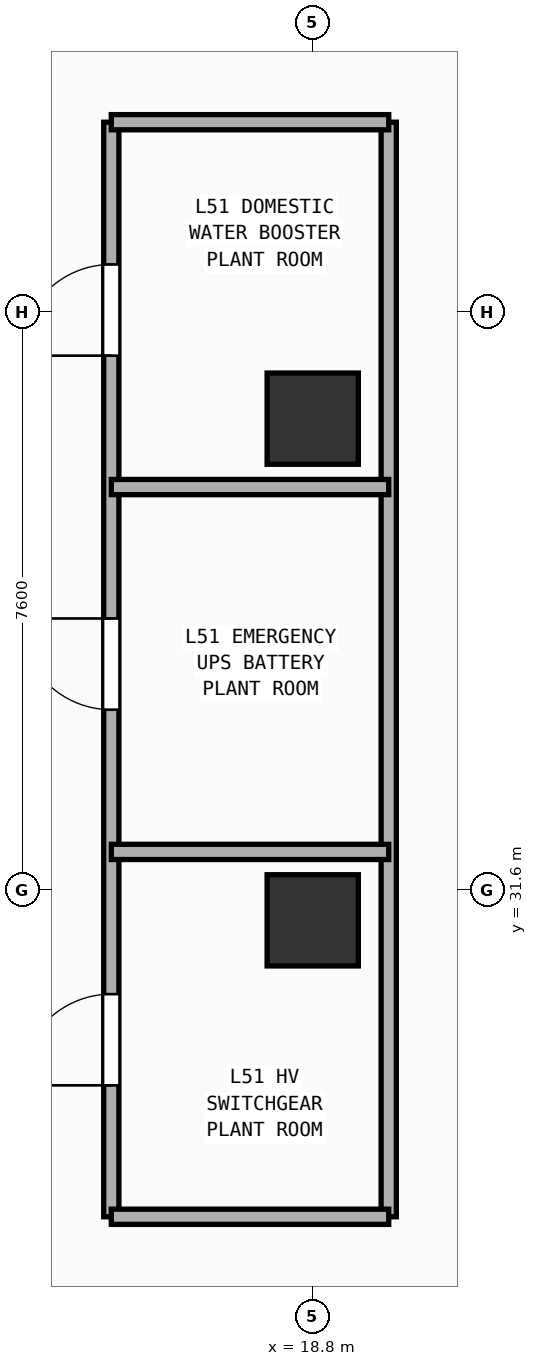
"""IFC4 building model, lengths in metres.
Left out: names, types, materials, properties, quantities, classifications, styles, units other than length and angle.
Written with IfcOpenShell. Run it as: python <this file> out.ifc"""

import sys

from ifc_helpers import new_model, si_unit, direction, frame, frame_2d, origin, origin_2d, place, context, subcontext, project, spatial, rectangle, extrude, element, fill, save


model = new_model("IFC4")
c1 = context("Model", 3, precision=1e-05, world=origin(), true_north=direction((0.0, 1.0)))
c2 = subcontext(c1, "Body", "Model", "MODEL_VIEW")
j1 = project(units=[si_unit("LENGTHUNIT", "METRE"), si_unit("PLANEANGLEUNIT", "RADIAN")], contexts=[c1])
p1 = place(None, origin())
s1 = spatial("IfcSite", under=j1, at=p1, CompositionType="ELEMENT")
p2 = place(p1, origin())
s2 = spatial("IfcBuilding", under=s1, at=p2, CompositionType="ELEMENT")
p3 = place(p2, frame((0.0, 0.0, 199.4)))
s3 = spatial("IfcBuildingStorey", under=s2, at=p3, CompositionType="ELEMENT", Elevation=199.4)
for number, where, z_axis, x_axis in (
    (1, (18.8, 31.2, 0.0), (0.0, 0.0, 1.0), (1.0, 0.0, 0.0)),
    (2, (18.8, 37.8, 0.0), (0.0, 0.0, 1.0), (1.0, 0.0, 0.0)),
):
    element("IfcColumn", number, at=place(p3, frame(where, z_axis=z_axis, x_axis=x_axis)), inside=s3, PredefinedType="COLUMN", context=c2, shape_type="SweptSolid", body=[
        extrude(rectangle(XDim=1.2, YDim=1.2, at=origin_2d()), origin(), (0.0, 0.0, 1.0), 4.86),
    ])
p4 = place(p3, frame((16.15, 27.3, 0.0), z_axis=(0.0, 0.0, 1.0), x_axis=(0.0, 1.0, 0.0)))
e3 = element("IfcWall", 3, at=p4, inside=s3, PredefinedType="PARTITIONING", context=c2, shape_type="SweptSolid", body=[
    extrude(rectangle(XDim=14.4, YDim=0.2, at=frame_2d((7.2, 0.0))), origin(), (0.0, 0.0, 1.0), 4.86),
])
p5 = place(p4, frame((1.729, 0.0, 0.0)))
e4 = element("IfcOpeningElement", 4, at=p5, cuts=e3, PredefinedType="OPENING", context=c2, shape_type="SweptSolid", body=[
    extrude(rectangle(XDim=1.2, YDim=2.25, at=frame_2d((0.6, 1.125))), frame((0.0, 0.11, 0.0), z_axis=(0.0, -1.0, 0.0), x_axis=(1.0, 0.0, 0.0)), (0.0, 0.0, 1.0), 0.22),
])
p6 = place(p4, frame((6.671, 0.0, 0.0)))
e5 = element("IfcOpeningElement", 5, at=p6, cuts=e3, PredefinedType="OPENING", context=c2, shape_type="SweptSolid", body=[
    extrude(rectangle(XDim=1.2, YDim=2.25, at=frame_2d((0.6, 1.125))), frame((0.0, 0.11, 0.0), z_axis=(0.0, -1.0, 0.0), x_axis=(1.0, 0.0, 0.0)), (0.0, 0.0, 1.0), 0.22),
])
p7 = place(p4, frame((11.329, 0.0, 0.0)))
e6 = element("IfcOpeningElement", 6, at=p7, cuts=e3, PredefinedType="OPENING", context=c2, shape_type="SweptSolid", body=[
    extrude(rectangle(XDim=1.2, YDim=2.25, at=frame_2d((0.6, 1.125))), frame((0.0, 0.11, 0.0), z_axis=(0.0, -1.0, 0.0), x_axis=(1.0, 0.0, 0.0)), (0.0, 0.0, 1.0), 0.22),
])
p8 = place(p3, frame((19.8, 27.3, 0.0), z_axis=(0.0, 0.0, 1.0), x_axis=(0.0, 1.0, 0.0)))
e7 = element("IfcWall", 7, at=p8, inside=s3, PredefinedType="PARTITIONING", context=c2, shape_type="SweptSolid", body=[
    extrude(rectangle(XDim=14.4, YDim=0.2, at=frame_2d((7.2, 0.0))), origin(), (0.0, 0.0, 1.0), 4.86),
])
for number, where, z_axis, x_axis in (
    (8, (16.15, 27.3, 0.0), (0.0, 0.0, 1.0), (1.0, 0.0, 0.0)),
    (9, (16.15, 41.7, 0.0), (0.0, 0.0, 1.0), (1.0, 0.0, 0.0)),
    (10, (16.15, 32.1, 0.0), (0.0, 0.0, 1.0), (1.0, 0.0, 0.0)),
    (11, (16.15, 36.9, 0.0), (0.0, 0.0, 1.0), (1.0, 0.0, 0.0)),
):
    element("IfcWall", number, at=place(p3, frame(where, z_axis=z_axis, x_axis=x_axis)), inside=s3, PredefinedType="PARTITIONING", context=c2, shape_type="SweptSolid", body=[
        extrude(rectangle(XDim=3.65, YDim=0.2, at=frame_2d((1.825, 0.0))), origin(), (0.0, 0.0, 1.0), 4.86),
    ])
p9 = place(p5, origin())
e12 = element("IfcDoor", 12, at=p9, inside=s3, OperationType="SINGLE_SWING_LEFT", PredefinedType="DOOR", context=c2, shape_type="SweptSolid", body=[
    extrude(rectangle(XDim=1.2, YDim=2.25, at=frame_2d((0.6, 1.125))), frame((0.0, 0.025, 0.0), z_axis=(0.0, -1.0, 0.0), x_axis=(1.0, 0.0, 0.0)), (0.0, 0.0, 1.0), 0.05),
])
fill(e4, e12)
p10 = place(p6, origin())
e13 = element("IfcDoor", 13, at=p10, inside=s3, OperationType="SINGLE_SWING_RIGHT", PredefinedType="DOOR", context=c2, shape_type="SweptSolid", body=[
    extrude(rectangle(XDim=1.2, YDim=2.25, at=frame_2d((0.6, 1.125))), frame((0.0, 0.025, 0.0), z_axis=(0.0, -1.0, 0.0), x_axis=(1.0, 0.0, 0.0)), (0.0, 0.0, 1.0), 0.05),
])
fill(e5, e13)
p11 = place(p7, origin())
e14 = element("IfcDoor", 14, at=p11, inside=s3, OperationType="SINGLE_SWING_LEFT", PredefinedType="DOOR", context=c2, shape_type="SweptSolid", body=[
    extrude(rectangle(XDim=1.2, YDim=2.25, at=frame_2d((0.6, 1.125))), frame((0.0, 0.025, 0.0), z_axis=(0.0, -1.0, 0.0), x_axis=(1.0, 0.0, 0.0)), (0.0, 0.0, 1.0), 0.05),
])
fill(e6, e14)
save(model, sys.argv[1])
